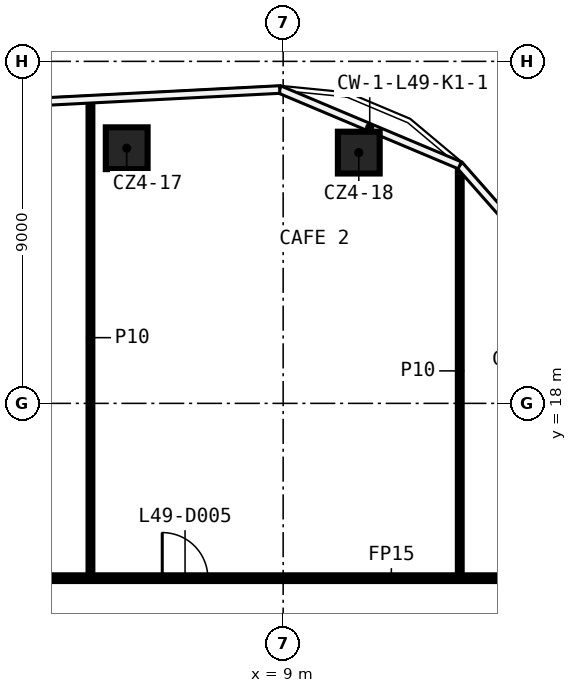
"""IFC4 building model, lengths in metres.
Left out: names, types, materials, properties, quantities, classifications, styles, units other than length and angle.
Written with IfcOpenShell. Run it as: python <this file> out.ifc"""

import sys

from ifc_helpers import new_model, si_unit, direction, frame, frame_2d, origin, origin_2d, place, context, subcontext, project, spatial, rectangle, extrude, element, fill, save


model = new_model("IFC4")
c1 = context("Model", 3, precision=1e-05, world=origin(), true_north=direction((0.0, 1.0)))
c2 = subcontext(c1, "Body", "Model", "MODEL_VIEW")
j1 = project(units=[si_unit("LENGTHUNIT", "METRE"), si_unit("PLANEANGLEUNIT", "RADIAN")], contexts=[c1])
p1 = place(None, origin())
s1 = spatial("IfcSite", under=j1, at=p1, CompositionType="ELEMENT")
p2 = place(p1, origin())
s2 = spatial("IfcBuilding", under=s1, at=p2, CompositionType="ELEMENT")
p3 = place(p2, frame((0.0, 0.0, 237.0)))
s3 = spatial("IfcBuildingStorey", under=s2, at=p3, CompositionType="ELEMENT", Elevation=237.0)
for number, where, z_axis, x_axis in (
    (1, (4.883, 24.714, 0.0), (0.0, 0.0, 1.0), (1.0, 0.0, 0.0)),
    (2, (10.99, 24.599, 0.0), (0.0, 0.0, 1.0), (1.0, 0.0, 0.0)),
):
    element("IfcColumn", number, at=place(p3, frame(where, z_axis=z_axis, x_axis=x_axis)), inside=s3, PredefinedType="COLUMN", context=c2, shape_type="SweptSolid", body=[
        extrude(rectangle(XDim=1.1, YDim=1.1, at=origin_2d()), origin(), (0.0, 0.0, 1.0), 3.82),
    ])
p4 = place(p3, frame((-2.075, 13.4, 0.0), z_axis=(0.0, 0.0, 1.0), x_axis=(1.0, 0.0, 0.0)))
e3 = element("IfcWall", 3, at=p4, inside=s3, PredefinedType="PARTITIONING", context=c2, shape_type="SweptSolid", body=[
    extrude(rectangle(XDim=18.55, YDim=0.15, at=frame_2d((9.275, 0.0))), origin(), (0.0, 0.0, 1.0), 3.82),
])
p5 = place(p4, frame((2.91, 0.0, 0.0)))
e4 = element("IfcOpeningElement", 4, at=p5, cuts=e3, PredefinedType="OPENING", context=c2, shape_type="SweptSolid", body=[
    extrude(rectangle(XDim=1.2, YDim=2.1, at=frame_2d((0.6, 1.05))), frame((0.0, 0.085, 0.0), z_axis=(0.0, -1.0, 0.0), x_axis=(1.0, 0.0, 0.0)), (0.0, 0.0, 1.0), 0.17),
])
p6 = place(p4, frame((7.894, 0.0, 0.0)))
e5 = element("IfcOpeningElement", 5, at=p6, cuts=e3, PredefinedType="OPENING", context=c2, shape_type="SweptSolid", body=[
    extrude(rectangle(XDim=1.2, YDim=2.1, at=frame_2d((0.6, 1.05))), frame((0.0, 0.085, 0.0), z_axis=(0.0, -1.0, 0.0), x_axis=(1.0, 0.0, 0.0)), (0.0, 0.0, 1.0), 0.17),
])
p7 = place(p3, frame((13.647, 13.475, 0.0), z_axis=(0.0, 0.0, 1.0), x_axis=(0.0, 1.0, 0.0)))
e6 = element("IfcWall", 6, at=p7, inside=s3, PredefinedType="PARTITIONING", context=c2, shape_type="SweptSolid", body=[
    extrude(rectangle(XDim=10.76, YDim=0.1, at=frame_2d((5.38, 0.0))), origin(), (0.0, 0.0, 1.0), 3.82),
])
p8 = place(p3, frame((3.929, 13.475, 0.0), z_axis=(0.0, 0.0, 1.0), x_axis=(0.0, 1.0, 0.0)))
e7 = element("IfcWall", 7, at=p8, inside=s3, PredefinedType="PARTITIONING", context=c2, shape_type="SweptSolid", body=[
    extrude(rectangle(XDim=12.508, YDim=0.1, at=frame_2d((6.254, 0.0))), origin(), (0.0, 0.0, 1.0), 3.82),
])
p9 = place(p6, origin())
e8 = element("IfcDoor", 8, at=p9, inside=s3, OperationType="SINGLE_SWING_RIGHT", PredefinedType="DOOR", context=c2, shape_type="SweptSolid", body=[
    extrude(rectangle(XDim=1.2, YDim=2.1, at=frame_2d((0.6, 1.05))), frame((0.0, 0.025, 0.0), z_axis=(0.0, -1.0, 0.0), x_axis=(1.0, 0.0, 0.0)), (0.0, 0.0, 1.0), 0.05),
])
fill(e5, e8)
save(model, sys.argv[1])
